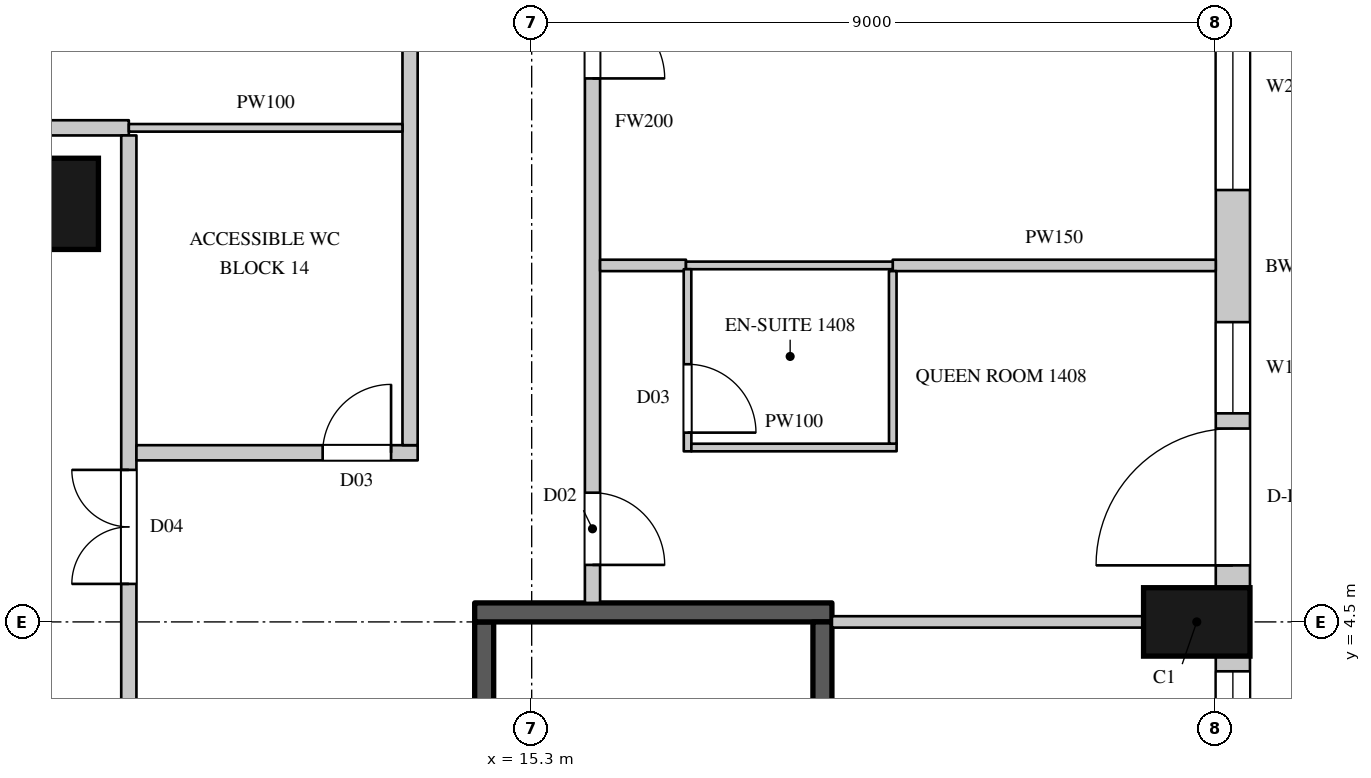
"""IFC4 building model, lengths in metres.
Left out: names, types, materials, properties, quantities, classifications, styles, units other than length and angle.
Written with IfcOpenShell. Run it as: python <this file> out.ifc"""

import sys

from ifc_helpers import new_model, si_unit, direction, frame, frame_2d, origin, origin_2d, place, context, subcontext, project, spatial, rectangle, circle, extrude, element, fill, save


model = new_model("IFC4")
c1 = context("Model", 3, precision=1e-05, world=origin(), true_north=direction((0.0, 1.0)))
c2 = subcontext(c1, "Body", "Model", "MODEL_VIEW")
j1 = project(units=[si_unit("LENGTHUNIT", "METRE"), si_unit("PLANEANGLEUNIT", "RADIAN")], contexts=[c1])
p1 = place(None, origin())
s1 = spatial("IfcSite", under=j1, at=p1, CompositionType="ELEMENT")
p2 = place(p1, origin())
s2 = spatial("IfcBuilding", under=s1, at=p2, CompositionType="ELEMENT")
p3 = place(p2, frame((0.0, 0.0, 80.7)))
s3 = spatial("IfcBuildingStorey", under=s2, at=p3, CompositionType="ELEMENT", Elevation=80.7)
p4 = place(p3, frame((24.05, 4.5, 0.0), z_axis=(0.0, 0.0, 1.0), x_axis=(0.0, 1.0, 0.0)))
e1 = element("IfcColumn", 1, at=p4, inside=s3, PredefinedType="COLUMN", context=c2, shape_type="SweptSolid", body=[
    extrude(rectangle(XDim=0.9, YDim=1.4, at=origin_2d()), origin(), (0.0, 0.0, 1.0), 3.6),
])
p5 = place(p3, frame((9.0, 10.0, 0.0), z_axis=(0.0, 0.0, 1.0), x_axis=(1.0, 0.0, 0.0)))
e2 = element("IfcColumn", 2, at=p5, inside=s3, PredefinedType="COLUMN", context=c2, shape_type="SweptSolid", body=[
    extrude(circle(Radius=0.6, at=origin_2d()), origin(), (0.0, 0.0, 1.0), 3.6),
])
p6 = place(p3, frame((24.525, -4.05, 0.0), z_axis=(0.0, 0.0, 1.0), x_axis=(0.0, 1.0, 0.0)))
e3 = element("IfcWall", 3, at=p6, inside=s3, PredefinedType="SOLIDWALL", context=c2, shape_type="SweptSolid", body=[
    extrude(rectangle(XDim=8.1, YDim=0.45, at=frame_2d((4.05, 0.0))), origin(), (0.0, 0.0, 1.0), 3.3),
])
p7 = place(p6, frame((0.2, 0.0, 0.0)))
e4 = element("IfcOpeningElement", 4, at=p7, cuts=e3, PredefinedType="OPENING", context=c2, shape_type="SweptSolid", body=[
    extrude(rectangle(XDim=1.8, YDim=2.4, at=frame_2d((0.9, 1.2))), frame((0.0, 0.235, 0.0), z_axis=(0.0, -1.0, 0.0), x_axis=(1.0, 0.0, 0.0)), (0.0, 0.0, 1.0), 0.47),
])
p8 = place(p6, frame((2.2, 0.0, 1.05)))
e5 = element("IfcOpeningElement", 5, at=p8, cuts=e3, PredefinedType="OPENING", context=c2, shape_type="SweptSolid", body=[
    extrude(rectangle(XDim=1.2, YDim=2.0, at=frame_2d((0.6, 1.0))), frame((0.0, 0.235, 0.0), z_axis=(0.0, -1.0, 0.0), x_axis=(1.0, 0.0, 0.0)), (0.0, 0.0, 1.0), 0.47),
])
p9 = place(p6, frame((4.7, 0.0, 0.0)))
e6 = element("IfcOpeningElement", 6, at=p9, cuts=e3, PredefinedType="OPENING", context=c2, shape_type="SweptSolid", body=[
    extrude(rectangle(XDim=1.8, YDim=2.4, at=frame_2d((0.9, 1.2))), frame((0.0, 0.235, 0.0), z_axis=(0.0, -1.0, 0.0), x_axis=(1.0, 0.0, 0.0)), (0.0, 0.0, 1.0), 0.47),
])
p10 = place(p6, frame((6.7, 0.0, 1.05)))
e7 = element("IfcOpeningElement", 7, at=p10, cuts=e3, PredefinedType="OPENING", context=c2, shape_type="SweptSolid", body=[
    extrude(rectangle(XDim=1.2, YDim=2.0, at=frame_2d((0.6, 1.0))), frame((0.0, 0.235, 0.0), z_axis=(0.0, -1.0, 0.0), x_axis=(1.0, 0.0, 0.0)), (0.0, 0.0, 1.0), 0.47),
])
p11 = place(p3, frame((24.525, 4.95, 0.0), z_axis=(0.0, 0.0, 1.0), x_axis=(0.0, 1.0, 0.0)))
e8 = element("IfcWall", 8, at=p11, inside=s3, PredefinedType="SOLIDWALL", context=c2, shape_type="SweptSolid", body=[
    extrude(rectangle(XDim=8.439, YDim=0.45, at=frame_2d((4.219, 0.0))), origin(), (0.0, 0.0, 1.0), 3.3),
])
p12 = place(p11, frame((0.294, 0.0, 0.0)))
e9 = element("IfcOpeningElement", 9, at=p12, cuts=e8, PredefinedType="OPENING", context=c2, shape_type="SweptSolid", body=[
    extrude(rectangle(XDim=1.8, YDim=2.4, at=frame_2d((0.9, 1.2))), frame((0.0, 0.235, 0.0), z_axis=(0.0, -1.0, 0.0), x_axis=(1.0, 0.0, 0.0)), (0.0, 0.0, 1.0), 0.47),
])
p13 = place(p11, frame((2.294, 0.0, 1.05)))
e10 = element("IfcOpeningElement", 10, at=p13, cuts=e8, PredefinedType="OPENING", context=c2, shape_type="SweptSolid", body=[
    extrude(rectangle(XDim=1.2, YDim=2.0, at=frame_2d((0.6, 1.0))), frame((0.0, 0.235, 0.0), z_axis=(0.0, -1.0, 0.0), x_axis=(1.0, 0.0, 0.0)), (0.0, 0.0, 1.0), 0.47),
])
p14 = place(p11, frame((5.232, 0.0, 1.05)))
e11 = element("IfcOpeningElement", 11, at=p14, cuts=e8, PredefinedType="OPENING", context=c2, shape_type="SweptSolid", body=[
    extrude(rectangle(XDim=2.7, YDim=2.0, at=frame_2d((1.35, 1.0))), frame((0.0, 0.235, 0.0), z_axis=(0.0, -1.0, 0.0), x_axis=(1.0, 0.0, 0.0)), (0.0, 0.0, 1.0), 0.47),
])
p15 = place(p3, frame((-7.9, 11.0, 0.0), z_axis=(0.0, 0.0, 1.0), x_axis=(1.0, 0.0, 0.0)))
e12 = element("IfcWall", 12, at=p15, inside=s3, PredefinedType="PARTITIONING", context=c2, shape_type="SweptSolid", body=[
    extrude(rectangle(XDim=17.9, YDim=0.2, at=frame_2d((8.95, 0.0))), origin(), (0.0, 0.0, 1.0), 3.3),
])
p16 = place(p15, frame((9.5, 0.0, 0.0)))
e13 = element("IfcOpeningElement", 13, at=p16, cuts=e12, PredefinedType="OPENING", context=c2, shape_type="SweptSolid", body=[
    extrude(rectangle(XDim=1.5, YDim=2.2, at=frame_2d((0.75, 1.1))), frame((0.0, 0.11, 0.0), z_axis=(0.0, -1.0, 0.0), x_axis=(1.0, 0.0, 0.0)), (0.0, 0.0, 1.0), 0.22),
])
p17 = place(p3, frame((10.0, -10.9, 0.0), z_axis=(0.0, 0.0, 1.0), x_axis=(0.0, 1.0, 0.0)))
e14 = element("IfcWall", 14, at=p17, inside=s3, PredefinedType="PARTITIONING", context=c2, shape_type="SweptSolid", body=[
    extrude(rectangle(XDim=21.8, YDim=0.2, at=frame_2d((10.9, 0.0))), origin(), (0.0, 0.0, 1.0), 3.3),
])
p18 = place(p17, frame((15.9, 0.0, 0.0)))
e15 = element("IfcOpeningElement", 15, at=p18, cuts=e14, PredefinedType="OPENING", context=c2, shape_type="SweptSolid", body=[
    extrude(rectangle(XDim=1.5, YDim=2.2, at=frame_2d((0.75, 1.1))), frame((0.0, 0.11, 0.0), z_axis=(0.0, -1.0, 0.0), x_axis=(1.0, 0.0, 0.0)), (0.0, 0.0, 1.0), 0.22),
])
p19 = place(p17, frame((8.75, 0.0, 0.0)))
e16 = element("IfcOpeningElement", 16, at=p19, cuts=e14, PredefinedType="OPENING", context=c2, shape_type="SweptSolid", body=[
    extrude(rectangle(XDim=1.5, YDim=2.2, at=frame_2d((0.75, 1.1))), frame((0.0, 0.11, 0.0), z_axis=(0.0, -1.0, 0.0), x_axis=(1.0, 0.0, 0.0)), (0.0, 0.0, 1.0), 0.22),
])
p20 = place(p3, frame((10.1, 6.725, 0.0), z_axis=(0.0, 0.0, 1.0), x_axis=(1.0, 0.0, 0.0)))
e17 = element("IfcWall", 17, at=p20, inside=s3, PredefinedType="PARTITIONING", context=c2, shape_type="SweptSolid", body=[
    extrude(rectangle(XDim=3.7, YDim=0.2, at=frame_2d((1.85, 0.0))), origin(), (0.0, 0.0, 1.0), 3.3),
])
p21 = place(p20, frame((2.45, 0.0, 0.0)))
e18 = element("IfcOpeningElement", 18, at=p21, cuts=e17, PredefinedType="OPENING", context=c2, shape_type="SweptSolid", body=[
    extrude(rectangle(XDim=0.9, YDim=2.2, at=frame_2d((0.45, 1.1))), frame((0.0, 0.11, 0.0), z_axis=(0.0, -1.0, 0.0), x_axis=(1.0, 0.0, 0.0)), (0.0, 0.0, 1.0), 0.22),
])
p22 = place(p3, frame((13.7, 6.825, 0.0), z_axis=(0.0, 0.0, 1.0), x_axis=(0.0, 1.0, 0.0)))
e19 = element("IfcWall", 19, at=p22, inside=s3, PredefinedType="PARTITIONING", context=c2, shape_type="SweptSolid", body=[
    extrude(rectangle(XDim=8.175, YDim=0.2, at=frame_2d((4.087, 0.0))), origin(), (0.0, 0.0, 1.0), 3.3),
])
p23 = place(p3, frame((16.1, 4.75, 0.0), z_axis=(0.0, 0.0, 1.0), x_axis=(0.0, 1.0, 0.0)))
e20 = element("IfcWall", 20, at=p23, inside=s3, PredefinedType="PARTITIONING", context=c2, shape_type="SweptSolid", body=[
    extrude(rectangle(XDim=12.65, YDim=0.2, at=frame_2d((6.325, 0.0))), origin(), (0.0, 0.0, 1.0), 3.3),
])
p24 = place(p23, frame((0.5, 0.0, 0.0)))
e21 = element("IfcOpeningElement", 21, at=p24, cuts=e20, PredefinedType="OPENING", context=c2, shape_type="SweptSolid", body=[
    extrude(rectangle(XDim=0.95, YDim=2.2, at=frame_2d((0.475, 1.1))), frame((0.0, 0.11, 0.0), z_axis=(0.0, -1.0, 0.0), x_axis=(1.0, 0.0, 0.0)), (0.0, 0.0, 1.0), 0.22),
])
p25 = place(p23, frame((6.9, 0.0, 0.0)))
e22 = element("IfcOpeningElement", 22, at=p25, cuts=e20, PredefinedType="OPENING", context=c2, shape_type="SweptSolid", body=[
    extrude(rectangle(XDim=0.95, YDim=2.2, at=frame_2d((0.475, 1.1))), frame((0.0, 0.11, 0.0), z_axis=(0.0, -1.0, 0.0), x_axis=(1.0, 0.0, 0.0)), (0.0, 0.0, 1.0), 0.22),
])
p26 = place(p3, frame((16.2, 9.19, 0.0), z_axis=(0.0, 0.0, 1.0), x_axis=(1.0, 0.0, 0.0)))
e23 = element("IfcWall", 23, at=p26, inside=s3, PredefinedType="PARTITIONING", context=c2, shape_type="SweptSolid", body=[
    extrude(rectangle(XDim=1.13, YDim=0.15, at=frame_2d((0.565, 0.0))), origin(), (0.0, 0.0, 1.0), 2.65),
])
p27 = place(p3, frame((19.25, 4.5, 0.0), z_axis=(0.0, 0.0, 1.0), x_axis=(1.0, 0.0, 0.0)))
e24 = element("IfcWall", 24, at=p27, inside=s3, PredefinedType="PARTITIONING", context=c2, shape_type="SweptSolid", body=[
    extrude(rectangle(XDim=4.1, YDim=0.15, at=frame_2d((2.05, 0.0))), origin(), (0.0, 0.0, 1.0), 3.3),
])
p28 = place(p3, frame((20.05, 9.19, 0.0), z_axis=(0.0, 0.0, 1.0), x_axis=(1.0, 0.0, 0.0)))
e25 = element("IfcWall", 25, at=p28, inside=s3, PredefinedType="PARTITIONING", context=c2, shape_type="SweptSolid", body=[
    extrude(rectangle(XDim=4.25, YDim=0.15, at=frame_2d((2.125, 0.0))), origin(), (0.0, 0.0, 1.0), 2.65),
])
p29 = place(p3, frame((14.675, -4.5, 0.0), z_axis=(0.0, 0.0, 1.0), x_axis=(0.0, 1.0, 0.0)))
e26 = element("IfcWall", 26, at=p29, inside=s3, PredefinedType="SHEAR", context=c2, shape_type="SweptSolid", body=[
    extrude(rectangle(XDim=9.0, YDim=0.25, at=frame_2d((4.5, 0.0))), origin(), (0.0, 0.0, 1.0), 3.3),
])
p30 = place(p29, frame((0.45, 0.0, 0.0)))
e27 = element("IfcOpeningElement", 27, at=p30, cuts=e26, PredefinedType="OPENING", context=c2, shape_type="SweptSolid", body=[
    extrude(rectangle(XDim=1.1, YDim=2.2, at=frame_2d((0.55, 1.1))), frame((0.0, 0.135, 0.0), z_axis=(0.0, -1.0, 0.0), x_axis=(1.0, 0.0, 0.0)), (0.0, 0.0, 1.0), 0.27),
])
p31 = place(p3, frame((14.55, 4.625, 0.0), z_axis=(0.0, 0.0, 1.0), x_axis=(1.0, 0.0, 0.0)))
e28 = element("IfcWall", 28, at=p31, inside=s3, PredefinedType="SHEAR", context=c2, shape_type="SweptSolid", body=[
    extrude(rectangle(XDim=4.7, YDim=0.25, at=frame_2d((2.35, 0.0))), origin(), (0.0, 0.0, 1.0), 3.3),
])
p32 = place(p3, frame((19.125, -4.5, 0.0), z_axis=(0.0, 0.0, 1.0), x_axis=(0.0, 1.0, 0.0)))
e29 = element("IfcWall", 29, at=p32, inside=s3, PredefinedType="SHEAR", context=c2, shape_type="SweptSolid", body=[
    extrude(rectangle(XDim=9.0, YDim=0.25, at=frame_2d((4.5, 0.0))), origin(), (0.0, 0.0, 1.0), 3.3),
])
p33 = place(p3, frame((10.0, 11.0, 0.0), z_axis=(0.0, 0.0, 1.0), x_axis=(1.0, 0.0, 0.0)))
e30 = element("IfcWall", 30, at=p33, inside=s3, PredefinedType="PARTITIONING", context=c2, shape_type="SweptSolid", body=[
    extrude(rectangle(XDim=3.6, YDim=0.1, at=frame_2d((1.8, 0.0))), origin(), (0.0, 0.0, 1.0), 3.3),
])
p34 = place(p3, frame((17.33, 9.19, 0.0), z_axis=(0.0, 0.0, 1.0), x_axis=(1.0, 0.0, 0.0)))
e31 = element("IfcWall", 31, at=p34, inside=s3, PredefinedType="PARTITIONING", context=c2, shape_type="SweptSolid", body=[
    extrude(rectangle(XDim=2.72, YDim=0.1, at=frame_2d((1.36, 0.0))), origin(), (0.0, 0.0, 1.0), 2.65),
])
p35 = place(p3, frame((17.35, 9.14, 0.0), z_axis=(0.0, 0.0, 1.0), x_axis=(0.000407580973, -0.999999916939, 0.0)))
e32 = element("IfcWall", 32, at=p35, inside=s3, PredefinedType="PARTITIONING", context=c2, shape_type="SweptSolid", body=[
    extrude(rectangle(XDim=2.396, YDim=0.1, at=frame_2d((1.198, 0.0))), origin(), (0.0, 0.0, 1.0), 3.3),
])
p36 = place(p35, frame((1.25, 0.0, 0.0)))
e33 = element("IfcOpeningElement", 33, at=p36, cuts=e32, PredefinedType="OPENING", context=c2, shape_type="SweptSolid", body=[
    extrude(rectangle(XDim=0.9, YDim=2.2, at=frame_2d((0.45, 1.1))), frame((0.0, 0.06, 0.0), z_axis=(0.0, -1.0, 0.0), x_axis=(1.0, 0.0, 0.0)), (0.0, 0.0, 1.0), 0.12),
])
p37 = place(p3, frame((17.401, 6.794, 0.0), z_axis=(0.0, 0.0, 1.0), x_axis=(0.9999999346, 0.000361663629, 0.0)))
e34 = element("IfcWall", 34, at=p37, inside=s3, PredefinedType="PARTITIONING", context=c2, shape_type="SweptSolid", body=[
    extrude(rectangle(XDim=2.7, YDim=0.1, at=frame_2d((1.35, 0.0))), origin(), (0.0, 0.0, 1.0), 3.3),
])
p38 = place(p3, frame((20.05, 9.115, 0.0), z_axis=(0.0, 0.0, 1.0), x_axis=(0.000430200003, -0.999999907464, 0.0)))
e35 = element("IfcWall", 35, at=p38, inside=s3, PredefinedType="PARTITIONING", context=c2, shape_type="SweptSolid", body=[
    extrude(rectangle(XDim=2.27, YDim=0.1, at=frame_2d((1.135, 0.0))), origin(), (0.0, 0.0, 1.0), 3.3),
])
p39 = place(p10, origin())
e36 = element("IfcWindow", 36, at=p39, inside=s3, PartitioningType="SINGLE_PANEL", PredefinedType="WINDOW", context=c2, shape_type="SweptSolid", body=[
    extrude(rectangle(XDim=1.2, YDim=2.0, at=frame_2d((0.6, 1.0))), frame((0.0, 0.135, 0.0), z_axis=(0.0, -1.0, 0.0), x_axis=(1.0, 0.0, 0.0)), (0.0, 0.0, 1.0), 0.06),
])
fill(e7, e36)
p40 = place(p12, origin())
e37 = element("IfcDoor", 37, at=p40, inside=s3, OperationType="SLIDING_TO_LEFT", PredefinedType="DOOR", context=c2, shape_type="SweptSolid", body=[
    extrude(rectangle(XDim=1.8, YDim=2.4, at=frame_2d((0.9, 1.2))), frame((0.0, 0.13, 0.0), z_axis=(0.0, -1.0, 0.0), x_axis=(1.0, 0.0, 0.0)), (0.0, 0.0, 1.0), 0.05),
])
fill(e9, e37)
p41 = place(p13, origin())
e38 = element("IfcWindow", 38, at=p41, inside=s3, PartitioningType="SINGLE_PANEL", PredefinedType="WINDOW", context=c2, shape_type="SweptSolid", body=[
    extrude(rectangle(XDim=1.2, YDim=2.0, at=frame_2d((0.6, 1.0))), frame((0.0, 0.135, 0.0), z_axis=(0.0, -1.0, 0.0), x_axis=(1.0, 0.0, 0.0)), (0.0, 0.0, 1.0), 0.06),
])
fill(e10, e38)
p42 = place(p14, origin())
e39 = element("IfcWindow", 39, at=p42, inside=s3, PartitioningType="SINGLE_PANEL", PredefinedType="WINDOW", context=c2, shape_type="SweptSolid", body=[
    extrude(rectangle(XDim=2.7, YDim=2.0, at=frame_2d((1.35, 1.0))), frame((0.0, 0.135, 0.0), z_axis=(0.0, -1.0, 0.0), x_axis=(1.0, 0.0, 0.0)), (0.0, 0.0, 1.0), 0.06),
])
fill(e11, e39)
p43 = place(p18, origin())
e40 = element("IfcDoor", 40, at=p43, inside=s3, OperationType="DOUBLE_DOOR_SINGLE_SWING", PredefinedType="DOOR", context=c2, shape_type="SweptSolid", body=[
    extrude(rectangle(XDim=1.5, YDim=2.2, at=frame_2d((0.75, 1.1))), frame((0.0, 0.025, 0.0), z_axis=(0.0, -1.0, 0.0), x_axis=(1.0, 0.0, 0.0)), (0.0, 0.0, 1.0), 0.05),
])
fill(e15, e40)
p44 = place(p21, origin())
e41 = element("IfcDoor", 41, at=p44, inside=s3, OperationType="SINGLE_SWING_RIGHT", PredefinedType="DOOR", context=c2, shape_type="SweptSolid", body=[
    extrude(rectangle(XDim=0.9, YDim=2.2, at=frame_2d((0.45, 1.1))), frame((0.0, 0.025, 0.0), z_axis=(0.0, -1.0, 0.0), x_axis=(1.0, 0.0, 0.0)), (0.0, 0.0, 1.0), 0.05),
])
fill(e18, e41)
p45 = place(p24, origin())
e42 = element("IfcDoor", 42, at=p45, inside=s3, OperationType="SINGLE_SWING_RIGHT", PredefinedType="DOOR", context=c2, shape_type="SweptSolid", body=[
    extrude(rectangle(XDim=0.95, YDim=2.2, at=frame_2d((0.475, 1.1))), frame((0.0, 0.025, 0.0), z_axis=(0.0, -1.0, 0.0), x_axis=(1.0, 0.0, 0.0)), (0.0, 0.0, 1.0), 0.05),
])
fill(e21, e42)
p46 = place(p36, origin())
e43 = element("IfcDoor", 43, at=p46, inside=s3, OperationType="SINGLE_SWING_RIGHT", PredefinedType="DOOR", context=c2, shape_type="SweptSolid", body=[
    extrude(rectangle(XDim=0.9, YDim=2.2, at=frame_2d((0.45, 1.1))), frame((0.0, 0.025, 0.0), z_axis=(0.0, -1.0, 0.0), x_axis=(1.0, 0.0, 0.0)), (0.0, 0.0, 1.0), 0.05),
])
fill(e33, e43)
p47 = place(p25, origin())
e44 = element("IfcDoor", 44, at=p47, inside=s3, OperationType="SINGLE_SWING_RIGHT", PredefinedType="DOOR", context=c2, shape_type="SweptSolid", body=[
    extrude(rectangle(XDim=0.95, YDim=2.2, at=frame_2d((0.475, 1.1))), frame((0.0, 0.025, 0.0), z_axis=(0.0, -1.0, 0.0), x_axis=(1.0, 0.0, 0.0)), (0.0, 0.0, 1.0), 0.05),
])
fill(e22, e44)
save(model, sys.argv[1])
